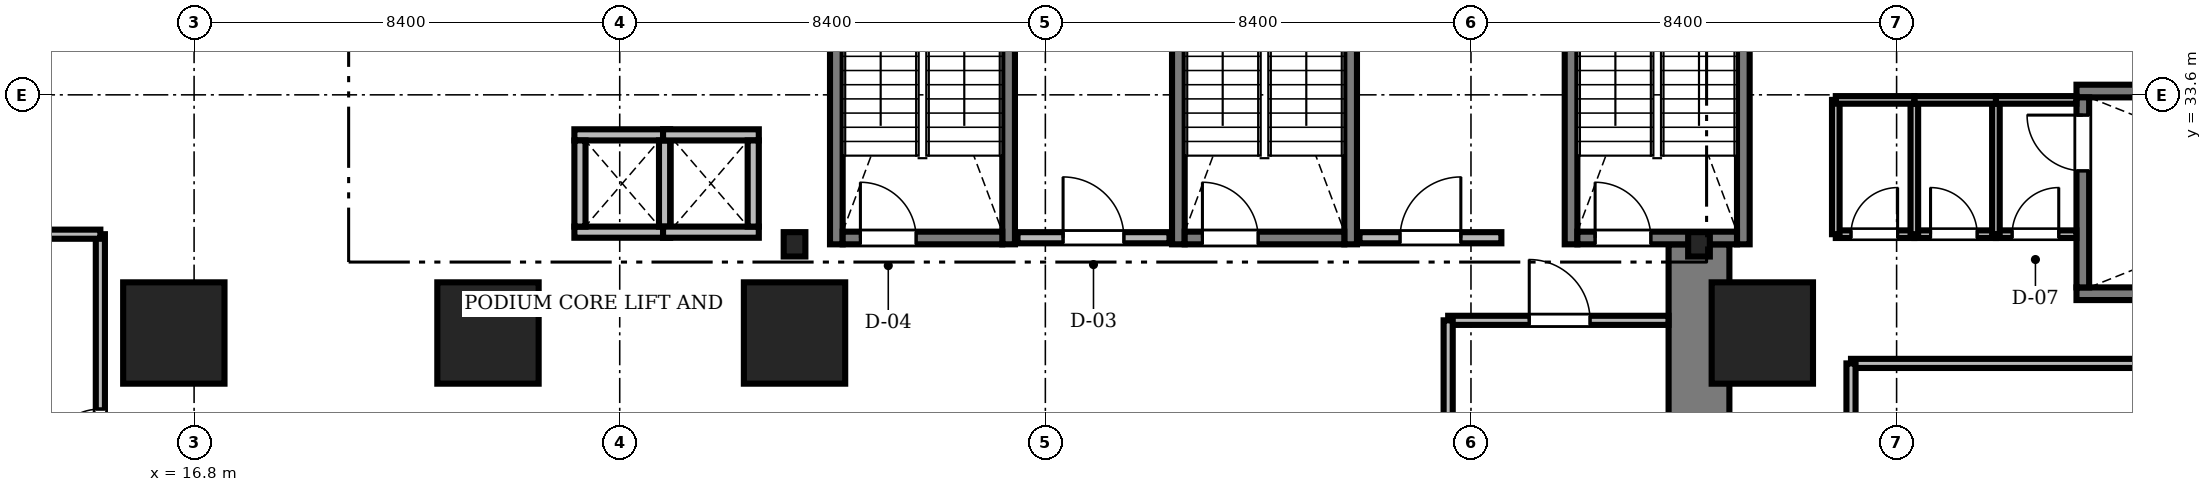
"""IFC4 building model, lengths in metres.
Left out: names, types, materials, properties, quantities, classifications, styles, units other than length and angle.
Written with IfcOpenShell. Run it as: python <this file> out.ifc"""

import sys

from ifc_helpers import new_model, si_unit, direction, frame, frame_2d, origin, origin_2d, place, context, subcontext, project, spatial, rectangle, i_section, extrude, source, transform, mapped, element, fill, save


model = new_model("IFC4")
c1 = context("Model", 3, precision=1e-05, world=origin(), true_north=direction((0.0, 1.0)))
c2 = subcontext(c1, "Body", "Model", "MODEL_VIEW")
j1 = project(units=[si_unit("LENGTHUNIT", "METRE"), si_unit("PLANEANGLEUNIT", "RADIAN")], contexts=[c1])
p1 = place(None, origin())
s1 = spatial("IfcSite", under=j1, at=p1, CompositionType="ELEMENT")
p2 = place(p1, origin())
s2 = spatial("IfcBuilding", under=s1, at=p2, CompositionType="ELEMENT")
p3 = place(p2, frame((0.0, 0.0, 6.0)))
s3 = spatial("IfcBuildingStorey", under=s2, at=p3, CompositionType="ELEMENT", Elevation=6.0)
m1 = source(origin(), c2, "Body", "SweptSolid", [
    extrude(rectangle(XDim=13.15, YDim=1.2, at=frame_2d((6.575, 0.0))), origin(), (0.0, 0.0, 1.0), 5.0),
])
p4 = place(p3, frame((46.5, 17.5, 0.0), z_axis=(0.0, 0.0, 1.0), x_axis=(0.0, 1.0, 0.0)))
e1 = element("IfcWall", 1, at=p4, inside=s3, PredefinedType="SHEAR", context=c2, shape_type="MappedRepresentation", body=[
    mapped(m1, transform((0.0, 0.0, 0.0), scale=1.0)),
])
m2 = source(origin(), c2, "Body", "SweptSolid", [
    extrude(i_section(OverallWidth=0.428, OverallDepth=0.481, WebThickness=0.04, FlangeThickness=0.063, FilletRadius=0.015, at=origin_2d()), origin(), (0.0, 0.0, 1.0), 5.0),
])
for number, where, z_axis, x_axis in (
    (2, (28.65, 30.65, 0.0), (0.0, 0.0, 1.0), (1.0, 0.0, 0.0)),
    (3, (46.5, 30.65, 0.0), (0.0, 0.0, 1.0), (1.0, 0.0, 0.0)),
):
    element("IfcColumn", number, at=place(p3, frame(where, z_axis=z_axis, x_axis=x_axis)), inside=s3, PredefinedType="COLUMN", context=c2, shape_type="MappedRepresentation", body=[
        mapped(m2, transform((0.0, 0.0, 0.0), scale=1.0)),
    ])
m3 = source(origin(), c2, "Body", "SweptSolid", [
    extrude(rectangle(XDim=2.0, YDim=2.0, at=origin_2d()), origin(), (0.0, 0.0, 1.0), 5.0),
])
for number, where, z_axis, x_axis in (
    (4, (16.4, 28.9, 0.0), (0.0, 0.0, 1.0), (1.0, 0.0, 0.0)),
    (5, (22.6, 28.9, 0.0), (0.0, 0.0, 1.0), (1.0, 0.0, 0.0)),
    (6, (28.65, 28.9, 0.0), (0.0, 0.0, 1.0), (1.0, 0.0, 0.0)),
    (7, (47.75, 28.9, 0.0), (0.0, 0.0, 1.0), (1.0, 0.0, 0.0)),
):
    element("IfcColumn", number, at=place(p3, frame(where, z_axis=z_axis, x_axis=x_axis)), inside=s3, PredefinedType="COLUMN", context=c2, shape_type="MappedRepresentation", body=[
        mapped(m3, transform((0.0, 0.0, 0.0), scale=1.0)),
    ])
m4 = source(origin(), c2, "Body", "SweptSolid", [
    extrude(rectangle(XDim=9.05, YDim=0.25, at=frame_2d((4.525, 0.0))), origin(), (0.0, 0.0, 1.0), 5.2),
])
for number, where, z_axis, x_axis in (
    (8, (29.475, 30.65, 0.0), (0.0, 0.0, 1.0), (0.0, 1.0, 0.0)),
    (9, (32.875, 30.65, 0.0), (0.0, 0.0, 1.0), (0.0, 1.0, 0.0)),
):
    element("IfcWall", number, at=place(p3, frame(where, z_axis=z_axis, x_axis=x_axis)), inside=s3, PredefinedType="SOLIDWALL", context=c2, shape_type="MappedRepresentation", body=[
        mapped(m4, transform((0.0, 0.0, 0.0), scale=1.0)),
    ])
m5 = source(origin(), c2, "Body", "SweptSolid", [
    extrude(rectangle(XDim=3.15, YDim=0.25, at=frame_2d((1.575, 0.0))), origin(), (0.0, 0.0, 1.0), 5.2),
])
p5 = place(p3, frame((29.6, 30.775, 0.0), z_axis=(0.0, 0.0, 1.0), x_axis=(1.0, 0.0, 0.0)))
e10 = element("IfcWall", 10, at=p5, inside=s3, PredefinedType="SOLIDWALL", context=c2, shape_type="MappedRepresentation", body=[
    mapped(m5, transform((0.0, 0.0, 0.0), scale=1.0)),
])
m6 = source(origin(), c2, "Body", "SweptSolid", [
    extrude(rectangle(XDim=1.1, YDim=2.2, at=frame_2d((0.55, 1.1))), frame((0.0, 0.135, 0.0), z_axis=(0.0, -1.0, 0.0), x_axis=(1.0, 0.0, 0.0)), (0.0, 0.0, 1.0), 0.27),
])
p6 = place(p5, frame((0.35, 0.0, 0.0)))
e11 = element("IfcOpeningElement", 11, at=p6, cuts=e10, PredefinedType="OPENING", context=c2, shape_type="MappedRepresentation", body=[
    mapped(m6, transform((0.0, 0.0, 0.0), scale=1.0)),
])
for number, where, z_axis, x_axis in (
    (12, (36.225, 30.65, 0.0), (0.0, 0.0, 1.0), (0.0, 1.0, 0.0)),
    (13, (39.625, 30.65, 0.0), (0.0, 0.0, 1.0), (0.0, 1.0, 0.0)),
):
    element("IfcWall", number, at=place(p3, frame(where, z_axis=z_axis, x_axis=x_axis)), inside=s3, PredefinedType="SOLIDWALL", context=c2, shape_type="MappedRepresentation", body=[
        mapped(m4, transform((0.0, 0.0, 0.0), scale=1.0)),
    ])
p7 = place(p3, frame((36.35, 30.775, 0.0), z_axis=(0.0, 0.0, 1.0), x_axis=(1.0, 0.0, 0.0)))
e14 = element("IfcWall", 14, at=p7, inside=s3, PredefinedType="SOLIDWALL", context=c2, shape_type="MappedRepresentation", body=[
    mapped(m5, transform((0.0, 0.0, 0.0), scale=1.0)),
])
p8 = place(p7, frame((0.35, 0.0, 0.0)))
e15 = element("IfcOpeningElement", 15, at=p8, cuts=e14, PredefinedType="OPENING", context=c2, shape_type="MappedRepresentation", body=[
    mapped(m6, transform((0.0, 0.0, 0.0), scale=1.0)),
])
for number, where, z_axis, x_axis in (
    (16, (43.975, 30.65, 0.0), (0.0, 0.0, 1.0), (0.0, 1.0, 0.0)),
    (17, (47.375, 30.65, 0.0), (0.0, 0.0, 1.0), (0.0, 1.0, 0.0)),
):
    element("IfcWall", number, at=place(p3, frame(where, z_axis=z_axis, x_axis=x_axis)), inside=s3, PredefinedType="SOLIDWALL", context=c2, shape_type="MappedRepresentation", body=[
        mapped(m4, transform((0.0, 0.0, 0.0), scale=1.0)),
    ])
p9 = place(p3, frame((44.1, 30.775, 0.0), z_axis=(0.0, 0.0, 1.0), x_axis=(1.0, 0.0, 0.0)))
e18 = element("IfcWall", 18, at=p9, inside=s3, PredefinedType="SOLIDWALL", context=c2, shape_type="MappedRepresentation", body=[
    mapped(m5, transform((0.0, 0.0, 0.0), scale=1.0)),
])
p10 = place(p9, frame((0.35, 0.0, 0.0)))
e19 = element("IfcOpeningElement", 19, at=p10, cuts=e18, PredefinedType="OPENING", context=c2, shape_type="MappedRepresentation", body=[
    mapped(m6, transform((0.0, 0.0, 0.0), scale=1.0)),
])
m7 = source(origin(), c2, "Body", "SweptSolid", [
    extrude(rectangle(XDim=9.9, YDim=0.25, at=frame_2d((4.95, 0.0))), origin(), (0.0, 0.0, 1.0), 5.0),
])
for number, where, z_axis, x_axis in (
    (20, (53.95, 29.675, 0.0), (0.0, 0.0, 1.0), (1.0, 0.0, 0.0)),
    (21, (53.95, 33.675, 0.0), (0.0, 0.0, 1.0), (1.0, 0.0, 0.0)),
):
    element("IfcWall", number, at=place(p3, frame(where, z_axis=z_axis, x_axis=x_axis)), inside=s3, PredefinedType="SOLIDWALL", context=c2, shape_type="MappedRepresentation", body=[
        mapped(m7, transform((0.0, 0.0, 0.0), scale=1.0)),
    ])
m8 = source(origin(), c2, "Body", "SweptSolid", [
    extrude(rectangle(XDim=3.75, YDim=0.25, at=frame_2d((1.875, 0.0))), origin(), (0.0, 0.0, 1.0), 5.0),
])
p11 = place(p3, frame((54.075, 29.8, 0.0), z_axis=(0.0, 0.0, 1.0), x_axis=(0.0, 1.0, 0.0)))
e22 = element("IfcWall", 22, at=p11, inside=s3, PredefinedType="SOLIDWALL", context=c2, shape_type="MappedRepresentation", body=[
    mapped(m8, transform((0.0, 0.0, 0.0), scale=1.0)),
])
p12 = place(p11, frame((2.3, 0.0, 0.0)))
e23 = element("IfcOpeningElement", 23, at=p12, cuts=e22, PredefinedType="OPENING", context=c2, shape_type="MappedRepresentation", body=[
    mapped(m6, transform((0.0, 0.0, 0.0), scale=1.0)),
])
m9 = source(origin(), c2, "Body", "SweptSolid", [
    extrude(rectangle(XDim=3.0, YDim=0.22, at=frame_2d((1.5, 0.0))), origin(), (0.0, 0.0, 1.0), 5.0),
])
p13 = place(p3, frame((33.05, 30.78, 0.0), z_axis=(0.0, 0.0, 1.0), x_axis=(1.0, 0.0, 0.0)))
e24 = element("IfcWall", 24, at=p13, inside=s3, PredefinedType="SOLIDWALL", context=c2, shape_type="MappedRepresentation", body=[
    mapped(m9, transform((0.0, 0.0, 0.0), scale=1.0)),
])
m10 = source(origin(), c2, "Body", "SweptSolid", [
    extrude(rectangle(XDim=1.2, YDim=2.2, at=frame_2d((0.6, 1.1))), frame((0.0, 0.12, 0.0), z_axis=(0.0, -1.0, 0.0), x_axis=(1.0, 0.0, 0.0)), (0.0, 0.0, 1.0), 0.24),
])
p14 = place(p13, frame((0.9, 0.0, 0.0)))
e25 = element("IfcOpeningElement", 25, at=p14, cuts=e24, PredefinedType="OPENING", context=c2, shape_type="MappedRepresentation", body=[
    mapped(m10, transform((0.0, 0.0, 0.0), scale=1.0)),
])
m11 = source(origin(), c2, "Body", "SweptSolid", [
    extrude(rectangle(XDim=2.8, YDim=0.22, at=frame_2d((1.4, 0.0))), origin(), (0.0, 0.0, 1.0), 5.0),
])
p15 = place(p3, frame((39.8, 30.78, 0.0), z_axis=(0.0, 0.0, 1.0), x_axis=(1.0, 0.0, 0.0)))
e26 = element("IfcWall", 26, at=p15, inside=s3, PredefinedType="SOLIDWALL", context=c2, shape_type="MappedRepresentation", body=[
    mapped(m11, transform((0.0, 0.0, 0.0), scale=1.0)),
])
p16 = place(p15, frame((0.8, 0.0, 0.0)))
e27 = element("IfcOpeningElement", 27, at=p16, cuts=e26, PredefinedType="OPENING", context=c2, shape_type="MappedRepresentation", body=[
    mapped(m10, transform((0.0, 0.0, 0.0), scale=1.0)),
])
m12 = source(origin(), c2, "Body", "SweptSolid", [
    extrude(rectangle(XDim=1.89, YDim=0.22, at=frame_2d((0.945, 0.0))), origin(), (0.0, 0.0, 1.0), 5.0),
])
for number, where, z_axis, x_axis in (
    (28, (24.305, 30.89, 0.0), (0.0, 0.0, 1.0), (1.0, 0.0, 0.0)),
    (29, (24.305, 32.81, 0.0), (0.0, 0.0, 1.0), (1.0, 0.0, 0.0)),
):
    element("IfcWall", number, at=place(p3, frame(where, z_axis=z_axis, x_axis=x_axis)), inside=s3, PredefinedType="SOLIDWALL", context=c2, shape_type="MappedRepresentation", body=[
        mapped(m12, transform((0.0, 0.0, 0.0), scale=1.0)),
    ])
m13 = source(origin(), c2, "Body", "SweptSolid", [
    extrude(rectangle(XDim=1.7, YDim=0.22, at=frame_2d((0.85, 0.0))), origin(), (0.0, 0.0, 1.0), 5.0),
])
for number, where, z_axis, x_axis in (
    (30, (24.415, 31.0, 0.0), (0.0, 0.0, 1.0), (0.0, 1.0, 0.0)),
    (31, (26.085, 31.0, 0.0), (0.0, 0.0, 1.0), (0.0, 1.0, 0.0)),
):
    element("IfcWall", number, at=place(p3, frame(where, z_axis=z_axis, x_axis=x_axis)), inside=s3, PredefinedType="SOLIDWALL", context=c2, shape_type="MappedRepresentation", body=[
        mapped(m13, transform((0.0, 0.0, 0.0), scale=1.0)),
    ])
for number, where, z_axis, x_axis in (
    (32, (26.055, 30.89, 0.0), (0.0, 0.0, 1.0), (1.0, 0.0, 0.0)),
    (33, (26.055, 32.81, 0.0), (0.0, 0.0, 1.0), (1.0, 0.0, 0.0)),
):
    element("IfcWall", number, at=place(p3, frame(where, z_axis=z_axis, x_axis=x_axis)), inside=s3, PredefinedType="SOLIDWALL", context=c2, shape_type="MappedRepresentation", body=[
        mapped(m12, transform((0.0, 0.0, 0.0), scale=1.0)),
    ])
p17 = place(p3, frame((27.835, 31.0, 0.0), z_axis=(0.0, 0.0, 1.0), x_axis=(0.0, 1.0, 0.0)))
e34 = element("IfcWall", 34, at=p17, inside=s3, PredefinedType="SOLIDWALL", context=c2, shape_type="MappedRepresentation", body=[
    mapped(m13, transform((0.0, 0.0, 0.0), scale=1.0)),
])
m14 = source(origin(), c2, "Body", "SweptSolid", [
    extrude(rectangle(XDim=8.5, YDim=0.18, at=frame_2d((4.25, 0.0))), origin(), (0.0, 0.0, 1.0), 5.0),
])
p18 = place(p3, frame((14.95, 22.35, 0.0), z_axis=(0.0, 0.0, 1.0), x_axis=(0.0, 1.0, 0.0)))
e35 = element("IfcWall", 35, at=p18, inside=s3, PredefinedType="PARTITIONING", context=c2, shape_type="MappedRepresentation", body=[
    mapped(m14, transform((0.0, 0.0, 0.0), scale=1.0)),
])
m15 = source(origin(), c2, "Body", "SweptSolid", [
    extrude(rectangle(XDim=1.05, YDim=2.2, at=frame_2d((0.525, 1.1))), frame((0.0, 0.1, 0.0), z_axis=(0.0, -1.0, 0.0), x_axis=(1.0, 0.0, 0.0)), (0.0, 0.0, 1.0), 0.2),
])
p19 = place(p18, frame((4.0, 0.0, 0.0)))
e36 = element("IfcOpeningElement", 36, at=p19, cuts=e35, PredefinedType="OPENING", context=c2, shape_type="MappedRepresentation", body=[
    mapped(m15, transform((0.0, 0.0, 0.0), scale=1.0)),
])
m16 = source(origin(), c2, "Body", "SweptSolid", [
    extrude(rectangle(XDim=4.348, YDim=0.18, at=frame_2d((2.174, 0.0))), origin(), (0.0, 0.0, 1.0), 5.0),
])
p20 = place(p3, frame((41.55, 29.15, 0.0), z_axis=(0.0, 0.0, 1.0), x_axis=(1.0, 0.0, 0.0)))
e37 = element("IfcWall", 37, at=p20, inside=s3, PredefinedType="PARTITIONING", context=c2, shape_type="MappedRepresentation", body=[
    mapped(m16, transform((0.0, 0.0, 0.0), scale=1.0)),
])
m17 = source(origin(), c2, "Body", "SweptSolid", [
    extrude(rectangle(XDim=1.2, YDim=2.2, at=frame_2d((0.6, 1.1))), frame((0.0, 0.1, 0.0), z_axis=(0.0, -1.0, 0.0), x_axis=(1.0, 0.0, 0.0)), (0.0, 0.0, 1.0), 0.2),
])
p21 = place(p20, frame((1.6, 0.0, 0.0)))
e38 = element("IfcOpeningElement", 38, at=p21, cuts=e37, PredefinedType="OPENING", context=c2, shape_type="MappedRepresentation", body=[
    mapped(m17, transform((0.0, 0.0, 0.0), scale=1.0)),
])
m18 = source(origin(), c2, "Body", "SweptSolid", [
    extrude(rectangle(XDim=1.588, YDim=0.15, at=frame_2d((0.794, 0.0))), origin(), (0.0, 0.0, 1.0), 5.0),
])
p22 = place(p3, frame((52.36, 30.85, 0.0), z_axis=(0.0, 0.0, 1.0), x_axis=(1.0, 0.0, 0.0)))
e39 = element("IfcWall", 39, at=p22, inside=s3, PredefinedType="PARTITIONING", context=c2, shape_type="MappedRepresentation", body=[
    mapped(m18, transform((0.0, 0.0, 0.0), scale=1.0)),
])
m19 = source(origin(), c2, "Body", "SweptSolid", [
    extrude(rectangle(XDim=0.92, YDim=2.1, at=frame_2d((0.46, 1.05))), frame((0.0, 0.085, 0.0), z_axis=(0.0, -1.0, 0.0), x_axis=(1.0, 0.0, 0.0)), (0.0, 0.0, 1.0), 0.17),
])
p23 = place(p22, frame((0.32, 0.0, 0.0)))
e40 = element("IfcOpeningElement", 40, at=p23, cuts=e39, PredefinedType="OPENING", context=c2, shape_type="MappedRepresentation", body=[
    mapped(m19, transform((0.0, 0.0, 0.0), scale=1.0)),
])
m20 = source(origin(), c2, "Body", "SweptSolid", [
    extrude(rectangle(XDim=1.61, YDim=0.15, at=frame_2d((0.805, 0.0))), origin(), (0.0, 0.0, 1.0), 5.0),
])
p24 = place(p3, frame((50.75, 30.85, 0.0), z_axis=(0.0, 0.0, 1.0), x_axis=(1.0, 0.0, 0.0)))
e41 = element("IfcWall", 41, at=p24, inside=s3, PredefinedType="PARTITIONING", context=c2, shape_type="MappedRepresentation", body=[
    mapped(m20, transform((0.0, 0.0, 0.0), scale=1.0)),
])
p25 = place(p24, frame((0.32, 0.0, 0.0)))
e42 = element("IfcOpeningElement", 42, at=p25, cuts=e41, PredefinedType="OPENING", context=c2, shape_type="MappedRepresentation", body=[
    mapped(m19, transform((0.0, 0.0, 0.0), scale=1.0)),
])
m21 = source(origin(), c2, "Body", "SweptSolid", [
    extrude(rectangle(XDim=1.55, YDim=0.15, at=frame_2d((0.775, 0.0))), origin(), (0.0, 0.0, 1.0), 5.0),
])
p26 = place(p3, frame((49.2, 30.85, 0.0), z_axis=(0.0, 0.0, 1.0), x_axis=(1.0, 0.0, 0.0)))
e43 = element("IfcWall", 43, at=p26, inside=s3, PredefinedType="PARTITIONING", context=c2, shape_type="MappedRepresentation", body=[
    mapped(m21, transform((0.0, 0.0, 0.0), scale=1.0)),
])
p27 = place(p26, frame((0.3, 0.0, 0.0)))
e44 = element("IfcOpeningElement", 44, at=p27, cuts=e43, PredefinedType="OPENING", context=c2, shape_type="MappedRepresentation", body=[
    mapped(m19, transform((0.0, 0.0, 0.0), scale=1.0)),
])
m22 = source(origin(), c2, "Body", "SweptSolid", [
    extrude(rectangle(XDim=14.75, YDim=0.18, at=frame_2d((7.375, 0.0))), origin(), (0.0, 0.0, 1.0), 4.392),
])
p28 = place(p3, frame((49.5, 28.3, 0.0), z_axis=(0.0, 0.0, 1.0), x_axis=(1.0, 0.0, 0.0)))
e45 = element("IfcWall", 45, at=p28, inside=s3, PredefinedType="PARTITIONING", context=c2, shape_type="MappedRepresentation", body=[
    mapped(m22, transform((0.0, 0.0, 0.0), scale=1.0)),
])
m23 = source(origin(), c2, "Body", "SweptSolid", [
    extrude(rectangle(XDim=11.75, YDim=0.18, at=frame_2d((5.875, 0.0))), origin(), (0.0, 0.0, 1.0), 4.468),
])
p29 = place(p3, frame((49.5, 16.55, 0.0), z_axis=(0.0, 0.0, 1.0), x_axis=(0.0, 1.0, 0.0)))
e46 = element("IfcWall", 46, at=p29, inside=s3, PredefinedType="PARTITIONING", context=c2, shape_type="MappedRepresentation", body=[
    mapped(m23, transform((0.0, 0.0, 0.0), scale=1.0)),
])
m24 = source(origin(), c2, "Body", "SweptSolid", [
    extrude(rectangle(XDim=11.2, YDim=0.18, at=frame_2d((5.6, 0.0))), origin(), (0.0, 0.0, 1.0), 5.0),
])
p30 = place(p3, frame((3.75, 30.85, 0.0), z_axis=(0.0, 0.0, 1.0), x_axis=(1.0, 0.0, 0.0)))
e47 = element("IfcWall", 47, at=p30, inside=s3, PredefinedType="PARTITIONING", context=c2, shape_type="MappedRepresentation", body=[
    mapped(m24, transform((0.0, 0.0, 0.0), scale=1.0)),
])
m25 = source(origin(), c2, "Body", "SweptSolid", [
    extrude(rectangle(XDim=2.65, YDim=0.15, at=frame_2d((1.325, 0.0))), origin(), (0.0, 0.0, 1.0), 5.0),
])
for number, where, z_axis, x_axis in (
    (48, (49.2, 30.85, 0.0), (0.0, 0.0, 1.0), (0.0, 1.0, 0.0)),
    (49, (50.75, 30.85, 0.0), (0.0, 0.0, 1.0), (0.0, 1.0, 0.0)),
    (50, (52.36, 30.85, 0.0), (0.0, 0.0, 1.0), (0.0, 1.0, 0.0)),
):
    element("IfcWall", number, at=place(p3, frame(where, z_axis=z_axis, x_axis=x_axis)), inside=s3, PredefinedType="PARTITIONING", context=c2, shape_type="MappedRepresentation", body=[
        mapped(m25, transform((0.0, 0.0, 0.0), scale=1.0)),
    ])
m26 = source(origin(), c2, "Body", "SweptSolid", [
    extrude(rectangle(XDim=2.35, YDim=0.18, at=frame_2d((1.175, 0.0))), origin(), (0.0, 0.0, 1.0), 5.0),
])
p31 = place(p3, frame((41.55, 26.8, 0.0), z_axis=(0.0, 0.0, 1.0), x_axis=(0.0, 1.0, 0.0)))
e51 = element("IfcWall", 51, at=p31, inside=s3, PredefinedType="PARTITIONING", context=c2, shape_type="MappedRepresentation", body=[
    mapped(m26, transform((0.0, 0.0, 0.0), scale=1.0)),
])
p32 = place(p3, frame((52.36, 33.5, 0.0), z_axis=(0.0, 0.0, 1.0), x_axis=(1.0, 0.0, 0.0)))
e52 = element("IfcWall", 52, at=p32, inside=s3, PredefinedType="PARTITIONING", context=c2, shape_type="MappedRepresentation", body=[
    mapped(m18, transform((0.0, 0.0, 0.0), scale=1.0)),
])
p33 = place(p3, frame((50.75, 33.5, 0.0), z_axis=(0.0, 0.0, 1.0), x_axis=(1.0, 0.0, 0.0)))
e53 = element("IfcWall", 53, at=p33, inside=s3, PredefinedType="PARTITIONING", context=c2, shape_type="MappedRepresentation", body=[
    mapped(m20, transform((0.0, 0.0, 0.0), scale=1.0)),
])
p34 = place(p3, frame((49.2, 33.5, 0.0), z_axis=(0.0, 0.0, 1.0), x_axis=(1.0, 0.0, 0.0)))
e54 = element("IfcWall", 54, at=p34, inside=s3, PredefinedType="PARTITIONING", context=c2, shape_type="MappedRepresentation", body=[
    mapped(m21, transform((0.0, 0.0, 0.0), scale=1.0)),
])
m27 = source(origin(), c2, "Body", "SweptSolid", [
    extrude(rectangle(XDim=1.1, YDim=2.2, at=frame_2d((0.55, 1.1))), frame((0.0, 0.025, 0.0), z_axis=(0.0, -1.0, 0.0), x_axis=(1.0, 0.0, 0.0)), (0.0, 0.0, 1.0), 0.05),
])
p35 = place(p6, origin())
e55 = element("IfcDoor", 55, at=p35, inside=s3, OperationType="SINGLE_SWING_LEFT", PredefinedType="DOOR", context=c2, shape_type="MappedRepresentation", body=[
    mapped(m27, transform((0.0, 0.0, 0.0), scale=1.0)),
])
fill(e11, e55)
p36 = place(p8, origin())
e56 = element("IfcDoor", 56, at=p36, inside=s3, OperationType="SINGLE_SWING_LEFT", PredefinedType="DOOR", context=c2, shape_type="MappedRepresentation", body=[
    mapped(m27, transform((0.0, 0.0, 0.0), scale=1.0)),
])
fill(e15, e56)
p37 = place(p10, origin())
e57 = element("IfcDoor", 57, at=p37, inside=s3, OperationType="SINGLE_SWING_LEFT", PredefinedType="DOOR", context=c2, shape_type="MappedRepresentation", body=[
    mapped(m27, transform((0.0, 0.0, 0.0), scale=1.0)),
])
fill(e19, e57)
p38 = place(p12, origin())
e58 = element("IfcDoor", 58, at=p38, inside=s3, OperationType="SINGLE_SWING_RIGHT", PredefinedType="DOOR", context=c2, shape_type="MappedRepresentation", body=[
    mapped(m27, transform((0.0, 0.0, 0.0), scale=1.0)),
])
fill(e23, e58)
m28 = source(origin(), c2, "Body", "SweptSolid", [
    extrude(rectangle(XDim=1.2, YDim=2.2, at=frame_2d((0.6, 1.1))), frame((0.0, 0.025, 0.0), z_axis=(0.0, -1.0, 0.0), x_axis=(1.0, 0.0, 0.0)), (0.0, 0.0, 1.0), 0.05),
])
p39 = place(p14, origin())
e59 = element("IfcDoor", 59, at=p39, inside=s3, OperationType="SINGLE_SWING_LEFT", PredefinedType="DOOR", context=c2, shape_type="MappedRepresentation", body=[
    mapped(m28, transform((0.0, 0.0, 0.0), scale=1.0)),
])
fill(e25, e59)
p40 = place(p16, origin())
e60 = element("IfcDoor", 60, at=p40, inside=s3, OperationType="SINGLE_SWING_RIGHT", PredefinedType="DOOR", context=c2, shape_type="MappedRepresentation", body=[
    mapped(m28, transform((0.0, 0.0, 0.0), scale=1.0)),
])
fill(e27, e60)
m29 = source(origin(), c2, "Body", "SweptSolid", [
    extrude(rectangle(XDim=1.05, YDim=2.2, at=frame_2d((0.525, 1.1))), frame((0.0, 0.025, 0.0), z_axis=(0.0, -1.0, 0.0), x_axis=(1.0, 0.0, 0.0)), (0.0, 0.0, 1.0), 0.05),
])
p41 = place(p19, origin())
e61 = element("IfcDoor", 61, at=p41, inside=s3, OperationType="SINGLE_SWING_LEFT", PredefinedType="DOOR", context=c2, shape_type="MappedRepresentation", body=[
    mapped(m29, transform((0.0, 0.0, 0.0), scale=1.0)),
])
fill(e36, e61)
p42 = place(p21, origin())
e62 = element("IfcDoor", 62, at=p42, inside=s3, OperationType="SINGLE_SWING_LEFT", PredefinedType="DOOR", context=c2, shape_type="MappedRepresentation", body=[
    mapped(m28, transform((0.0, 0.0, 0.0), scale=1.0)),
])
fill(e38, e62)
m30 = source(origin(), c2, "Body", "SweptSolid", [
    extrude(rectangle(XDim=0.92, YDim=2.1, at=frame_2d((0.46, 1.05))), frame((0.0, 0.025, 0.0), z_axis=(0.0, -1.0, 0.0), x_axis=(1.0, 0.0, 0.0)), (0.0, 0.0, 1.0), 0.05),
])
p43 = place(p23, origin())
e63 = element("IfcDoor", 63, at=p43, inside=s3, OperationType="SINGLE_SWING_RIGHT", PredefinedType="DOOR", context=c2, shape_type="MappedRepresentation", body=[
    mapped(m30, transform((0.0, 0.0, 0.0), scale=1.0)),
])
fill(e40, e63)
p44 = place(p25, origin())
e64 = element("IfcDoor", 64, at=p44, inside=s3, OperationType="SINGLE_SWING_LEFT", PredefinedType="DOOR", context=c2, shape_type="MappedRepresentation", body=[
    mapped(m30, transform((0.0, 0.0, 0.0), scale=1.0)),
])
fill(e42, e64)
p45 = place(p27, origin())
e65 = element("IfcDoor", 65, at=p45, inside=s3, OperationType="SINGLE_SWING_RIGHT", PredefinedType="DOOR", context=c2, shape_type="MappedRepresentation", body=[
    mapped(m30, transform((0.0, 0.0, 0.0), scale=1.0)),
])
fill(e44, e65)
save(model, sys.argv[1])
